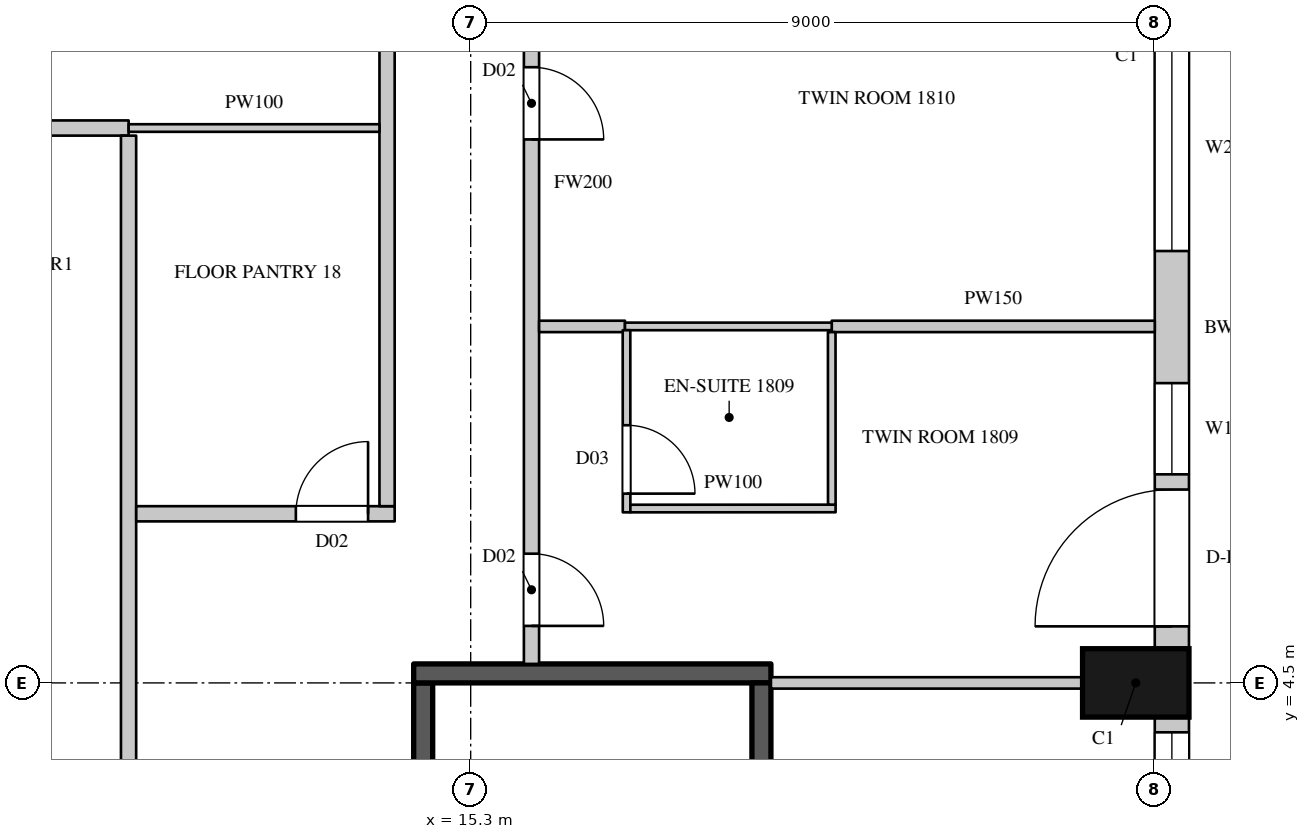
"""IFC4 building model, lengths in metres.
Left out: names, types, materials, properties, quantities, classifications, styles, units other than length and angle.
Written with IfcOpenShell. Run it as: python <this file> out.ifc"""

import sys

from ifc_helpers import new_model, si_unit, direction, frame, frame_2d, origin, origin_2d, place, context, subcontext, project, spatial, rectangle, extrude, element, fill, save


model = new_model("IFC4")
c1 = context("Model", 3, precision=1e-05, world=origin(), true_north=direction((0.0, 1.0)))
c2 = subcontext(c1, "Body", "Model", "MODEL_VIEW")
j1 = project(units=[si_unit("LENGTHUNIT", "METRE"), si_unit("PLANEANGLEUNIT", "RADIAN")], contexts=[c1])
p1 = place(None, origin())
s1 = spatial("IfcSite", under=j1, at=p1, CompositionType="ELEMENT")
p2 = place(p1, origin())
s2 = spatial("IfcBuilding", under=s1, at=p2, CompositionType="ELEMENT")
p3 = place(p2, frame((0.0, 0.0, 95.1)))
s3 = spatial("IfcBuildingStorey", under=s2, at=p3, CompositionType="ELEMENT", Elevation=95.1)
p4 = place(p3, frame((24.05, 4.5, 0.0), z_axis=(0.0, 0.0, 1.0), x_axis=(0.0, 1.0, 0.0)))
e1 = element("IfcColumn", 1, at=p4, inside=s3, PredefinedType="COLUMN", context=c2, shape_type="SweptSolid", body=[
    extrude(rectangle(XDim=0.9, YDim=1.4, at=origin_2d()), origin(), (0.0, 0.0, 1.0), 3.6),
])
p5 = place(p3, frame((24.525, -4.05, 0.0), z_axis=(0.0, 0.0, 1.0), x_axis=(0.0, 1.0, 0.0)))
e2 = element("IfcWall", 2, at=p5, inside=s3, PredefinedType="SOLIDWALL", context=c2, shape_type="SweptSolid", body=[
    extrude(rectangle(XDim=8.1, YDim=0.45, at=frame_2d((4.05, 0.0))), origin(), (0.0, 0.0, 1.0), 3.3),
])
p6 = place(p5, frame((0.2, 0.0, 0.0)))
e3 = element("IfcOpeningElement", 3, at=p6, cuts=e2, PredefinedType="OPENING", context=c2, shape_type="SweptSolid", body=[
    extrude(rectangle(XDim=1.8, YDim=2.4, at=frame_2d((0.9, 1.2))), frame((0.0, 0.235, 0.0), z_axis=(0.0, -1.0, 0.0), x_axis=(1.0, 0.0, 0.0)), (0.0, 0.0, 1.0), 0.47),
])
p7 = place(p5, frame((2.2, 0.0, 1.05)))
e4 = element("IfcOpeningElement", 4, at=p7, cuts=e2, PredefinedType="OPENING", context=c2, shape_type="SweptSolid", body=[
    extrude(rectangle(XDim=1.2, YDim=2.0, at=frame_2d((0.6, 1.0))), frame((0.0, 0.235, 0.0), z_axis=(0.0, -1.0, 0.0), x_axis=(1.0, 0.0, 0.0)), (0.0, 0.0, 1.0), 0.47),
])
p8 = place(p5, frame((4.7, 0.0, 0.0)))
e5 = element("IfcOpeningElement", 5, at=p8, cuts=e2, PredefinedType="OPENING", context=c2, shape_type="SweptSolid", body=[
    extrude(rectangle(XDim=1.8, YDim=2.4, at=frame_2d((0.9, 1.2))), frame((0.0, 0.235, 0.0), z_axis=(0.0, -1.0, 0.0), x_axis=(1.0, 0.0, 0.0)), (0.0, 0.0, 1.0), 0.47),
])
p9 = place(p5, frame((6.7, 0.0, 1.05)))
e6 = element("IfcOpeningElement", 6, at=p9, cuts=e2, PredefinedType="OPENING", context=c2, shape_type="SweptSolid", body=[
    extrude(rectangle(XDim=1.2, YDim=2.0, at=frame_2d((0.6, 1.0))), frame((0.0, 0.235, 0.0), z_axis=(0.0, -1.0, 0.0), x_axis=(1.0, 0.0, 0.0)), (0.0, 0.0, 1.0), 0.47),
])
p10 = place(p3, frame((24.525, 4.95, 0.0), z_axis=(0.0, 0.0, 1.0), x_axis=(0.0, 1.0, 0.0)))
e7 = element("IfcWall", 7, at=p10, inside=s3, PredefinedType="SOLIDWALL", context=c2, shape_type="SweptSolid", body=[
    extrude(rectangle(XDim=8.439, YDim=0.45, at=frame_2d((4.219, 0.0))), origin(), (0.0, 0.0, 1.0), 3.3),
])
p11 = place(p10, frame((0.294, 0.0, 0.0)))
e8 = element("IfcOpeningElement", 8, at=p11, cuts=e7, PredefinedType="OPENING", context=c2, shape_type="SweptSolid", body=[
    extrude(rectangle(XDim=1.8, YDim=2.4, at=frame_2d((0.9, 1.2))), frame((0.0, 0.235, 0.0), z_axis=(0.0, -1.0, 0.0), x_axis=(1.0, 0.0, 0.0)), (0.0, 0.0, 1.0), 0.47),
])
p12 = place(p10, frame((2.294, 0.0, 1.05)))
e9 = element("IfcOpeningElement", 9, at=p12, cuts=e7, PredefinedType="OPENING", context=c2, shape_type="SweptSolid", body=[
    extrude(rectangle(XDim=1.2, YDim=2.0, at=frame_2d((0.6, 1.0))), frame((0.0, 0.235, 0.0), z_axis=(0.0, -1.0, 0.0), x_axis=(1.0, 0.0, 0.0)), (0.0, 0.0, 1.0), 0.47),
])
p13 = place(p10, frame((5.232, 0.0, 1.05)))
e10 = element("IfcOpeningElement", 10, at=p13, cuts=e7, PredefinedType="OPENING", context=c2, shape_type="SweptSolid", body=[
    extrude(rectangle(XDim=2.7, YDim=2.0, at=frame_2d((1.35, 1.0))), frame((0.0, 0.235, 0.0), z_axis=(0.0, -1.0, 0.0), x_axis=(1.0, 0.0, 0.0)), (0.0, 0.0, 1.0), 0.47),
])
p14 = place(p3, frame((-8.9, 11.8, 0.0), z_axis=(0.0, 0.0, 1.0), x_axis=(1.0, 0.0, 0.0)))
e11 = element("IfcWall", 11, at=p14, inside=s3, PredefinedType="PARTITIONING", context=c2, shape_type="SweptSolid", body=[
    extrude(rectangle(XDim=19.7, YDim=0.2, at=frame_2d((9.85, 0.0))), origin(), (0.0, 0.0, 1.0), 3.3),
])
p15 = place(p14, frame((0.8, 0.0, 0.0)))
e12 = element("IfcOpeningElement", 12, at=p15, cuts=e11, PredefinedType="OPENING", context=c2, shape_type="SweptSolid", body=[
    extrude(rectangle(XDim=1.5, YDim=2.2, at=frame_2d((0.75, 1.1))), frame((0.0, 0.11, 0.0), z_axis=(0.0, -1.0, 0.0), x_axis=(1.0, 0.0, 0.0)), (0.0, 0.0, 1.0), 0.22),
])
p16 = place(p3, frame((10.799, -12.5, 0.0), z_axis=(0.0, 0.0, 1.0), x_axis=(0.0, 1.0, 0.0)))
e13 = element("IfcWall", 13, at=p16, inside=s3, PredefinedType="PARTITIONING", context=c2, shape_type="SweptSolid", body=[
    extrude(rectangle(XDim=24.2, YDim=0.2, at=frame_2d((12.1, 0.0))), origin(), (0.0, 0.0, 1.0), 3.3),
])
p17 = place(p16, frame((13.15, 0.0, 0.0)))
e14 = element("IfcOpeningElement", 14, at=p17, cuts=e13, PredefinedType="OPENING", context=c2, shape_type="SweptSolid", body=[
    extrude(rectangle(XDim=1.5, YDim=2.2, at=frame_2d((0.75, 1.1))), frame((0.0, 0.11, 0.0), z_axis=(0.0, -1.0, 0.0), x_axis=(1.0, 0.0, 0.0)), (0.0, 0.0, 1.0), 0.22),
])
p18 = place(p3, frame((10.9, 6.725, 0.0), z_axis=(0.0, 0.0, 1.0), x_axis=(1.0, 0.0, 0.0)))
e15 = element("IfcWall", 15, at=p18, inside=s3, PredefinedType="PARTITIONING", context=c2, shape_type="SweptSolid", body=[
    extrude(rectangle(XDim=3.4, YDim=0.2, at=frame_2d((1.7, 0.0))), origin(), (0.0, 0.0, 1.0), 3.3),
])
p19 = place(p18, frame((2.1, 0.0, 0.0)))
e16 = element("IfcOpeningElement", 16, at=p19, cuts=e15, PredefinedType="OPENING", context=c2, shape_type="SweptSolid", body=[
    extrude(rectangle(XDim=0.95, YDim=2.2, at=frame_2d((0.475, 1.1))), frame((0.0, 0.11, 0.0), z_axis=(0.0, -1.0, 0.0), x_axis=(1.0, 0.0, 0.0)), (0.0, 0.0, 1.0), 0.22),
])
p20 = place(p3, frame((14.2, 6.825, 0.0), z_axis=(0.0, 0.0, 1.0), x_axis=(0.0, 1.0, 0.0)))
e17 = element("IfcWall", 17, at=p20, inside=s3, PredefinedType="PARTITIONING", context=c2, shape_type="SweptSolid", body=[
    extrude(rectangle(XDim=8.675, YDim=0.2, at=frame_2d((4.337, 0.0))), origin(), (0.0, 0.0, 1.0), 3.3),
])
p21 = place(p3, frame((16.1, 4.75, 0.0), z_axis=(0.0, 0.0, 1.0), x_axis=(0.0, 1.0, 0.0)))
e18 = element("IfcWall", 18, at=p21, inside=s3, PredefinedType="PARTITIONING", context=c2, shape_type="SweptSolid", body=[
    extrude(rectangle(XDim=12.65, YDim=0.2, at=frame_2d((6.325, 0.0))), origin(), (0.0, 0.0, 1.0), 3.3),
])
p22 = place(p21, frame((0.5, 0.0, 0.0)))
e19 = element("IfcOpeningElement", 19, at=p22, cuts=e18, PredefinedType="OPENING", context=c2, shape_type="SweptSolid", body=[
    extrude(rectangle(XDim=0.95, YDim=2.2, at=frame_2d((0.475, 1.1))), frame((0.0, 0.11, 0.0), z_axis=(0.0, -1.0, 0.0), x_axis=(1.0, 0.0, 0.0)), (0.0, 0.0, 1.0), 0.22),
])
p23 = place(p21, frame((6.9, 0.0, 0.0)))
e20 = element("IfcOpeningElement", 20, at=p23, cuts=e18, PredefinedType="OPENING", context=c2, shape_type="SweptSolid", body=[
    extrude(rectangle(XDim=0.95, YDim=2.2, at=frame_2d((0.475, 1.1))), frame((0.0, 0.11, 0.0), z_axis=(0.0, -1.0, 0.0), x_axis=(1.0, 0.0, 0.0)), (0.0, 0.0, 1.0), 0.22),
])
p24 = place(p3, frame((16.2, 9.19, 0.0), z_axis=(0.0, 0.0, 1.0), x_axis=(1.0, 0.0, 0.0)))
e21 = element("IfcWall", 21, at=p24, inside=s3, PredefinedType="PARTITIONING", context=c2, shape_type="SweptSolid", body=[
    extrude(rectangle(XDim=1.13, YDim=0.15, at=frame_2d((0.565, 0.0))), origin(), (0.0, 0.0, 1.0), 2.65),
])
p25 = place(p3, frame((19.25, 4.5, 0.0), z_axis=(0.0, 0.0, 1.0), x_axis=(1.0, 0.0, 0.0)))
e22 = element("IfcWall", 22, at=p25, inside=s3, PredefinedType="PARTITIONING", context=c2, shape_type="SweptSolid", body=[
    extrude(rectangle(XDim=4.1, YDim=0.15, at=frame_2d((2.05, 0.0))), origin(), (0.0, 0.0, 1.0), 3.3),
])
p26 = place(p3, frame((20.05, 9.19, 0.0), z_axis=(0.0, 0.0, 1.0), x_axis=(1.0, 0.0, 0.0)))
e23 = element("IfcWall", 23, at=p26, inside=s3, PredefinedType="PARTITIONING", context=c2, shape_type="SweptSolid", body=[
    extrude(rectangle(XDim=4.25, YDim=0.15, at=frame_2d((2.125, 0.0))), origin(), (0.0, 0.0, 1.0), 2.65),
])
p27 = place(p3, frame((14.675, -4.5, 0.0), z_axis=(0.0, 0.0, 1.0), x_axis=(0.0, 1.0, 0.0)))
e24 = element("IfcWall", 24, at=p27, inside=s3, PredefinedType="SHEAR", context=c2, shape_type="SweptSolid", body=[
    extrude(rectangle(XDim=9.0, YDim=0.25, at=frame_2d((4.5, 0.0))), origin(), (0.0, 0.0, 1.0), 3.3),
])
p28 = place(p27, frame((0.45, 0.0, 0.0)))
e25 = element("IfcOpeningElement", 25, at=p28, cuts=e24, PredefinedType="OPENING", context=c2, shape_type="SweptSolid", body=[
    extrude(rectangle(XDim=1.1, YDim=2.2, at=frame_2d((0.55, 1.1))), frame((0.0, 0.135, 0.0), z_axis=(0.0, -1.0, 0.0), x_axis=(1.0, 0.0, 0.0)), (0.0, 0.0, 1.0), 0.27),
])
p29 = place(p3, frame((14.55, 4.625, 0.0), z_axis=(0.0, 0.0, 1.0), x_axis=(1.0, 0.0, 0.0)))
e26 = element("IfcWall", 26, at=p29, inside=s3, PredefinedType="SHEAR", context=c2, shape_type="SweptSolid", body=[
    extrude(rectangle(XDim=4.7, YDim=0.25, at=frame_2d((2.35, 0.0))), origin(), (0.0, 0.0, 1.0), 3.3),
])
p30 = place(p3, frame((19.125, -4.5, 0.0), z_axis=(0.0, 0.0, 1.0), x_axis=(0.0, 1.0, 0.0)))
e27 = element("IfcWall", 27, at=p30, inside=s3, PredefinedType="SHEAR", context=c2, shape_type="SweptSolid", body=[
    extrude(rectangle(XDim=9.0, YDim=0.25, at=frame_2d((4.5, 0.0))), origin(), (0.0, 0.0, 1.0), 3.3),
])
p31 = place(p3, frame((10.8, 11.8, 0.0), z_axis=(0.0, 0.0, 1.0), x_axis=(1.0, 0.0, 0.0)))
e28 = element("IfcWall", 28, at=p31, inside=s3, PredefinedType="PARTITIONING", context=c2, shape_type="SweptSolid", body=[
    extrude(rectangle(XDim=3.3, YDim=0.1, at=frame_2d((1.65, 0.0))), origin(), (0.0, 0.0, 1.0), 3.3),
])
p32 = place(p3, frame((17.33, 9.19, 0.0), z_axis=(0.0, 0.0, 1.0), x_axis=(1.0, 0.0, 0.0)))
e29 = element("IfcWall", 29, at=p32, inside=s3, PredefinedType="PARTITIONING", context=c2, shape_type="SweptSolid", body=[
    extrude(rectangle(XDim=2.72, YDim=0.1, at=frame_2d((1.36, 0.0))), origin(), (0.0, 0.0, 1.0), 2.65),
])
p33 = place(p3, frame((17.35, 9.14, 0.0), z_axis=(0.0, 0.0, 1.0), x_axis=(0.000407580973, -0.999999916939, 0.0)))
e30 = element("IfcWall", 30, at=p33, inside=s3, PredefinedType="PARTITIONING", context=c2, shape_type="SweptSolid", body=[
    extrude(rectangle(XDim=2.396, YDim=0.1, at=frame_2d((1.198, 0.0))), origin(), (0.0, 0.0, 1.0), 3.3),
])
p34 = place(p33, frame((1.25, 0.0, 0.0)))
e31 = element("IfcOpeningElement", 31, at=p34, cuts=e30, PredefinedType="OPENING", context=c2, shape_type="SweptSolid", body=[
    extrude(rectangle(XDim=0.9, YDim=2.2, at=frame_2d((0.45, 1.1))), frame((0.0, 0.06, 0.0), z_axis=(0.0, -1.0, 0.0), x_axis=(1.0, 0.0, 0.0)), (0.0, 0.0, 1.0), 0.12),
])
p35 = place(p3, frame((17.401, 6.794, 0.0), z_axis=(0.0, 0.0, 1.0), x_axis=(0.9999999346, 0.000361663629, 0.0)))
e32 = element("IfcWall", 32, at=p35, inside=s3, PredefinedType="PARTITIONING", context=c2, shape_type="SweptSolid", body=[
    extrude(rectangle(XDim=2.7, YDim=0.1, at=frame_2d((1.35, 0.0))), origin(), (0.0, 0.0, 1.0), 3.3),
])
p36 = place(p3, frame((20.05, 9.115, 0.0), z_axis=(0.0, 0.0, 1.0), x_axis=(0.000430200003, -0.999999907464, 0.0)))
e33 = element("IfcWall", 33, at=p36, inside=s3, PredefinedType="PARTITIONING", context=c2, shape_type="SweptSolid", body=[
    extrude(rectangle(XDim=2.27, YDim=0.1, at=frame_2d((1.135, 0.0))), origin(), (0.0, 0.0, 1.0), 3.3),
])
p37 = place(p9, origin())
e34 = element("IfcWindow", 34, at=p37, inside=s3, PartitioningType="SINGLE_PANEL", PredefinedType="WINDOW", context=c2, shape_type="SweptSolid", body=[
    extrude(rectangle(XDim=1.2, YDim=2.0, at=frame_2d((0.6, 1.0))), frame((0.0, 0.135, 0.0), z_axis=(0.0, -1.0, 0.0), x_axis=(1.0, 0.0, 0.0)), (0.0, 0.0, 1.0), 0.06),
])
fill(e6, e34)
p38 = place(p11, origin())
e35 = element("IfcDoor", 35, at=p38, inside=s3, OperationType="SLIDING_TO_LEFT", PredefinedType="DOOR", context=c2, shape_type="SweptSolid", body=[
    extrude(rectangle(XDim=1.8, YDim=2.4, at=frame_2d((0.9, 1.2))), frame((0.0, 0.13, 0.0), z_axis=(0.0, -1.0, 0.0), x_axis=(1.0, 0.0, 0.0)), (0.0, 0.0, 1.0), 0.05),
])
fill(e8, e35)
p39 = place(p12, origin())
e36 = element("IfcWindow", 36, at=p39, inside=s3, PartitioningType="SINGLE_PANEL", PredefinedType="WINDOW", context=c2, shape_type="SweptSolid", body=[
    extrude(rectangle(XDim=1.2, YDim=2.0, at=frame_2d((0.6, 1.0))), frame((0.0, 0.135, 0.0), z_axis=(0.0, -1.0, 0.0), x_axis=(1.0, 0.0, 0.0)), (0.0, 0.0, 1.0), 0.06),
])
fill(e9, e36)
p40 = place(p13, origin())
e37 = element("IfcWindow", 37, at=p40, inside=s3, PartitioningType="SINGLE_PANEL", PredefinedType="WINDOW", context=c2, shape_type="SweptSolid", body=[
    extrude(rectangle(XDim=2.7, YDim=2.0, at=frame_2d((1.35, 1.0))), frame((0.0, 0.135, 0.0), z_axis=(0.0, -1.0, 0.0), x_axis=(1.0, 0.0, 0.0)), (0.0, 0.0, 1.0), 0.06),
])
fill(e10, e37)
p41 = place(p19, origin())
e38 = element("IfcDoor", 38, at=p41, inside=s3, OperationType="SINGLE_SWING_RIGHT", PredefinedType="DOOR", context=c2, shape_type="SweptSolid", body=[
    extrude(rectangle(XDim=0.95, YDim=2.2, at=frame_2d((0.475, 1.1))), frame((0.0, 0.025, 0.0), z_axis=(0.0, -1.0, 0.0), x_axis=(1.0, 0.0, 0.0)), (0.0, 0.0, 1.0), 0.05),
])
fill(e16, e38)
p42 = place(p22, origin())
e39 = element("IfcDoor", 39, at=p42, inside=s3, OperationType="SINGLE_SWING_RIGHT", PredefinedType="DOOR", context=c2, shape_type="SweptSolid", body=[
    extrude(rectangle(XDim=0.95, YDim=2.2, at=frame_2d((0.475, 1.1))), frame((0.0, 0.025, 0.0), z_axis=(0.0, -1.0, 0.0), x_axis=(1.0, 0.0, 0.0)), (0.0, 0.0, 1.0), 0.05),
])
fill(e19, e39)
p43 = place(p34, origin())
e40 = element("IfcDoor", 40, at=p43, inside=s3, OperationType="SINGLE_SWING_RIGHT", PredefinedType="DOOR", context=c2, shape_type="SweptSolid", body=[
    extrude(rectangle(XDim=0.9, YDim=2.2, at=frame_2d((0.45, 1.1))), frame((0.0, 0.025, 0.0), z_axis=(0.0, -1.0, 0.0), x_axis=(1.0, 0.0, 0.0)), (0.0, 0.0, 1.0), 0.05),
])
fill(e31, e40)
p44 = place(p23, origin())
e41 = element("IfcDoor", 41, at=p44, inside=s3, OperationType="SINGLE_SWING_RIGHT", PredefinedType="DOOR", context=c2, shape_type="SweptSolid", body=[
    extrude(rectangle(XDim=0.95, YDim=2.2, at=frame_2d((0.475, 1.1))), frame((0.0, 0.025, 0.0), z_axis=(0.0, -1.0, 0.0), x_axis=(1.0, 0.0, 0.0)), (0.0, 0.0, 1.0), 0.05),
])
fill(e20, e41)
save(model, sys.argv[1])
